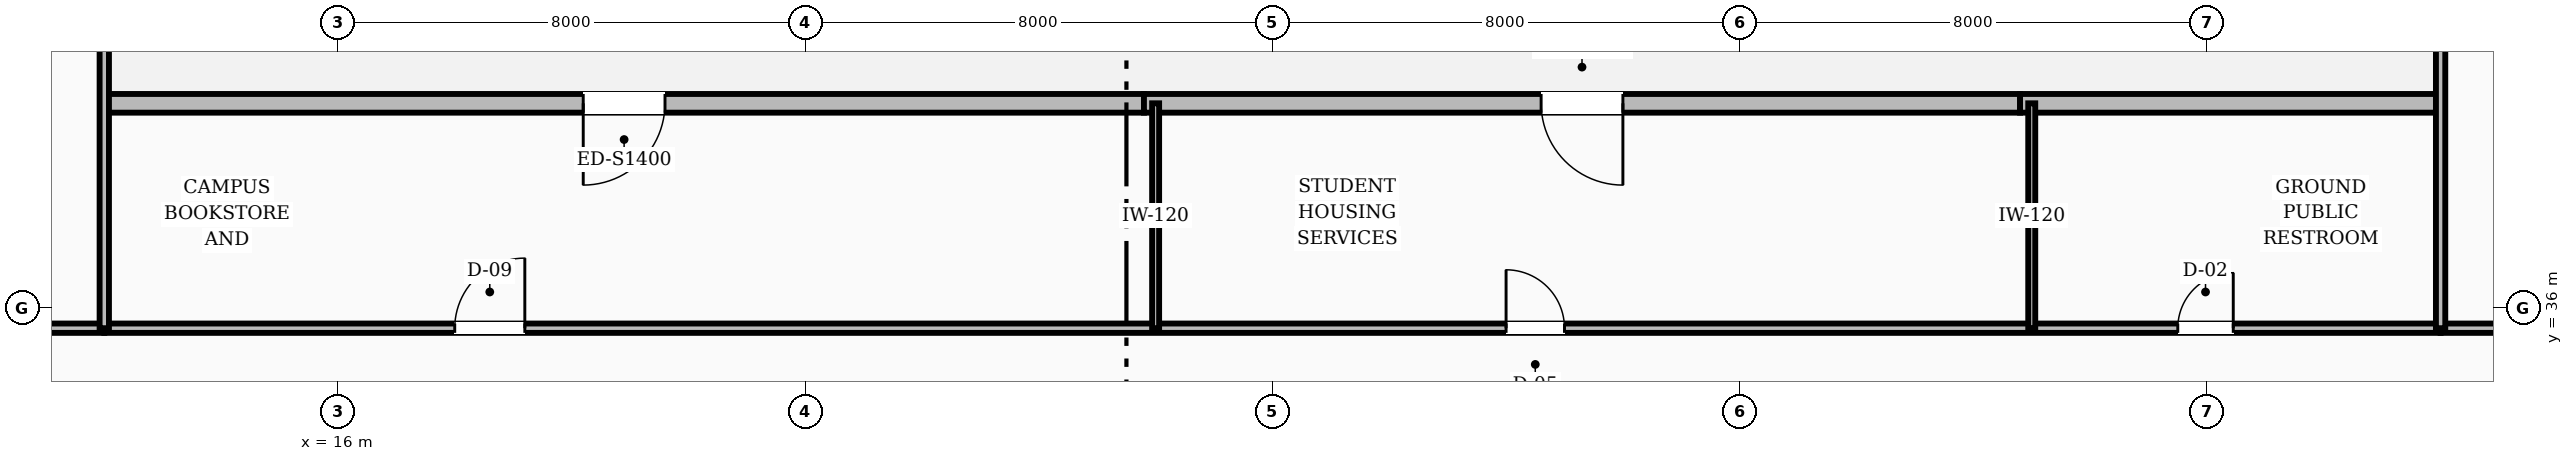
"""IFC4 building model, lengths in metres.
Left out: names, types, materials, properties, quantities, classifications, styles, units other than length and angle.
Written with IfcOpenShell. Run it as: python <this file> out.ifc"""

import sys

from ifc_helpers import new_model, si_unit, direction, frame, frame_2d, origin, place, context, subcontext, project, spatial, rectangle, extrude, element, fill, save


model = new_model("IFC4")
c1 = context("Model", 3, precision=1e-05, world=origin(), true_north=direction((0.0, 1.0)))
c2 = subcontext(c1, "Body", "Model", "MODEL_VIEW")
j1 = project(units=[si_unit("LENGTHUNIT", "METRE"), si_unit("PLANEANGLEUNIT", "RADIAN")], contexts=[c1])
p1 = place(None, origin())
s1 = spatial("IfcSite", under=j1, at=p1, CompositionType="ELEMENT")
p2 = place(p1, origin())
s2 = spatial("IfcBuilding", under=s1, at=p2, CompositionType="ELEMENT")
p3 = place(p2, origin())
s3 = spatial("IfcBuildingStorey", under=s2, at=p3, CompositionType="ELEMENT", Elevation=0.0)
p4 = place(p3, frame((29.8, 39.5, 0.0), z_axis=(0.0, 0.0, 1.0), x_axis=(-1.0, 0.0, 0.0)))
e1 = element("IfcWall", 1, at=p4, inside=s3, PredefinedType="STANDARD", context=c2, shape_type="SweptSolid", body=[
    extrude(rectangle(XDim=17.8, YDim=0.32, at=frame_2d((8.9, 0.0))), origin(), (0.0, 0.0, 1.0), 3.97),
])
p5 = place(p4, frame((8.2, 0.0, 0.0)))
e2 = element("IfcOpeningElement", 2, at=p5, cuts=e1, PredefinedType="OPENING", context=c2, shape_type="SweptSolid", body=[
    extrude(rectangle(XDim=1.4, YDim=2.25, at=frame_2d((0.7, 1.125))), frame((0.0, 0.17, 0.0), z_axis=(0.0, -1.0, 0.0), x_axis=(1.0, 0.0, 0.0)), (0.0, 0.0, 1.0), 0.34),
])
p6 = place(p3, frame((44.8, 39.5, 0.0), z_axis=(0.0, 0.0, 1.0), x_axis=(-1.0, 0.0, 0.0)))
e3 = element("IfcWall", 3, at=p6, inside=s3, PredefinedType="STANDARD", context=c2, shape_type="SweptSolid", body=[
    extrude(rectangle(XDim=15.0, YDim=0.32, at=frame_2d((7.5, 0.0))), origin(), (0.0, 0.0, 1.0), 3.97),
])
p7 = place(p6, frame((6.8, 0.0, 0.0)))
e4 = element("IfcOpeningElement", 4, at=p7, cuts=e3, PredefinedType="OPENING", context=c2, shape_type="SweptSolid", body=[
    extrude(rectangle(XDim=1.4, YDim=2.25, at=frame_2d((0.7, 1.125))), frame((0.0, 0.17, 0.0), z_axis=(0.0, -1.0, 0.0), x_axis=(1.0, 0.0, 0.0)), (0.0, 0.0, 1.0), 0.34),
])
p8 = place(p3, frame((52.0, 39.5, 0.0), z_axis=(0.0, 0.0, 1.0), x_axis=(-1.0, 0.0, 0.0)))
e5 = element("IfcWall", 5, at=p8, inside=s3, PredefinedType="STANDARD", context=c2, shape_type="SweptSolid", body=[
    extrude(rectangle(XDim=7.2, YDim=0.32, at=frame_2d((3.6, 0.0))), origin(), (0.0, 0.0, 1.0), 3.97),
])
p9 = place(p3, frame((12.0, 35.65, 0.0), z_axis=(0.0, 0.0, 1.0), x_axis=(1.0, 0.0, 0.0)))
e6 = element("IfcWall", 6, at=p9, inside=s3, PredefinedType="SOLIDWALL", context=c2, shape_type="SweptSolid", body=[
    extrude(rectangle(XDim=40.0, YDim=0.16, at=frame_2d((20.0, 0.0))), origin(), (0.0, 0.0, 1.0), 3.92),
])
p10 = place(p9, frame((6.0, 0.0, 0.0)))
e7 = element("IfcOpeningElement", 7, at=p10, cuts=e6, PredefinedType="OPENING", context=c2, shape_type="SweptSolid", body=[
    extrude(rectangle(XDim=1.2, YDim=2.1, at=frame_2d((0.6, 1.05))), frame((0.0, 0.09, 0.0), z_axis=(0.0, -1.0, 0.0), x_axis=(1.0, 0.0, 0.0)), (0.0, 0.0, 1.0), 0.18),
])
p11 = place(p9, frame((24.0, 0.0, 0.0)))
e8 = element("IfcOpeningElement", 8, at=p11, cuts=e6, PredefinedType="OPENING", context=c2, shape_type="SweptSolid", body=[
    extrude(rectangle(XDim=1.0, YDim=2.1, at=frame_2d((0.5, 1.05))), frame((0.0, 0.09, 0.0), z_axis=(0.0, -1.0, 0.0), x_axis=(1.0, 0.0, 0.0)), (0.0, 0.0, 1.0), 0.18),
])
p12 = place(p9, frame((35.5, 0.0, 0.0)))
e9 = element("IfcOpeningElement", 9, at=p12, cuts=e6, PredefinedType="OPENING", context=c2, shape_type="SweptSolid", body=[
    extrude(rectangle(XDim=0.95, YDim=2.1, at=frame_2d((0.475, 1.05))), frame((0.0, 0.09, 0.0), z_axis=(0.0, -1.0, 0.0), x_axis=(1.0, 0.0, 0.0)), (0.0, 0.0, 1.0), 0.18),
])
for number, where, z_axis, x_axis in (
    (10, (8.65, 35.65, 0.0), (0.0, 0.0, 1.0), (1.0, 0.0, 0.0)),
    (11, (52.0, 35.65, 0.0), (0.0, 0.0, 1.0), (1.0, 0.0, 0.0)),
):
    element("IfcWall", number, at=place(p3, frame(where, z_axis=z_axis, x_axis=x_axis)), inside=s3, PredefinedType="SOLIDWALL", context=c2, shape_type="SweptSolid", body=[
        extrude(rectangle(XDim=3.35, YDim=0.16, at=frame_2d((1.675, 0.0))), origin(), (0.0, 0.0, 1.0), 3.92),
    ])
for number, where, z_axis, x_axis in (
    (12, (12.0, 35.65, 0.0), (0.0, 0.0, 1.0), (0.0, 1.0, 0.0)),
    (13, (52.0, 35.65, 0.0), (0.0, 0.0, 1.0), (0.0, 1.0, 0.0)),
):
    element("IfcWall", number, at=place(p3, frame(where, z_axis=z_axis, x_axis=x_axis)), inside=s3, PredefinedType="SOLIDWALL", context=c2, shape_type="SweptSolid", body=[
        extrude(rectangle(XDim=9.35, YDim=0.16, at=frame_2d((4.675, 0.0))), origin(), (0.0, 0.0, 1.0), 3.92),
    ])
for number, where, z_axis, x_axis in (
    (14, (30.0, 35.65, 0.0), (0.0, 0.0, 1.0), (0.0, 1.0, 0.0)),
    (15, (45.0, 35.65, 0.0), (0.0, 0.0, 1.0), (0.0, 1.0, 0.0)),
):
    element("IfcWall", number, at=place(p3, frame(where, z_axis=z_axis, x_axis=x_axis)), inside=s3, PredefinedType="PARTITIONING", context=c2, shape_type="SweptSolid", body=[
        extrude(rectangle(XDim=3.85, YDim=0.12, at=frame_2d((1.925, 0.0))), origin(), (0.0, 0.0, 1.0), 3.92),
    ])
p13 = place(p5, frame((1.4, 0.0, 0.0), z_axis=(0.0, 0.0, 1.0), x_axis=(-1.0, 0.0, 0.0)))
e16 = element("IfcDoor", 16, at=p13, inside=s3, OperationType="SINGLE_SWING_RIGHT", PredefinedType="DOOR", context=c2, shape_type="SweptSolid", body=[
    extrude(rectangle(XDim=1.4, YDim=2.25, at=frame_2d((0.7, 1.125))), frame((0.0, 0.025, 0.0), z_axis=(0.0, -1.0, 0.0), x_axis=(1.0, 0.0, 0.0)), (0.0, 0.0, 1.0), 0.05),
])
fill(e2, e16)
p14 = place(p7, frame((1.4, 0.0, 0.0), z_axis=(0.0, 0.0, 1.0), x_axis=(-1.0, 0.0, 0.0)))
e17 = element("IfcDoor", 17, at=p14, inside=s3, OperationType="SINGLE_SWING_LEFT", PredefinedType="DOOR", context=c2, shape_type="SweptSolid", body=[
    extrude(rectangle(XDim=1.4, YDim=2.25, at=frame_2d((0.7, 1.125))), frame((0.0, 0.025, 0.0), z_axis=(0.0, -1.0, 0.0), x_axis=(1.0, 0.0, 0.0)), (0.0, 0.0, 1.0), 0.05),
])
fill(e4, e17)
p15 = place(p10, origin())
e18 = element("IfcDoor", 18, at=p15, inside=s3, OperationType="SINGLE_SWING_RIGHT", PredefinedType="DOOR", context=c2, shape_type="SweptSolid", body=[
    extrude(rectangle(XDim=1.2, YDim=2.1, at=frame_2d((0.6, 1.05))), frame((0.0, 0.025, 0.0), z_axis=(0.0, -1.0, 0.0), x_axis=(1.0, 0.0, 0.0)), (0.0, 0.0, 1.0), 0.05),
])
fill(e7, e18)
p16 = place(p11, origin())
e19 = element("IfcDoor", 19, at=p16, inside=s3, OperationType="SINGLE_SWING_LEFT", PredefinedType="DOOR", context=c2, shape_type="SweptSolid", body=[
    extrude(rectangle(XDim=1.0, YDim=2.1, at=frame_2d((0.5, 1.05))), frame((0.0, 0.025, 0.0), z_axis=(0.0, -1.0, 0.0), x_axis=(1.0, 0.0, 0.0)), (0.0, 0.0, 1.0), 0.05),
])
fill(e8, e19)
p17 = place(p12, origin())
e20 = element("IfcDoor", 20, at=p17, inside=s3, OperationType="SINGLE_SWING_RIGHT", PredefinedType="DOOR", context=c2, shape_type="SweptSolid", body=[
    extrude(rectangle(XDim=0.95, YDim=2.1, at=frame_2d((0.475, 1.05))), frame((0.0, 0.025, 0.0), z_axis=(0.0, -1.0, 0.0), x_axis=(1.0, 0.0, 0.0)), (0.0, 0.0, 1.0), 0.05),
])
fill(e9, e20)
save(model, sys.argv[1])
